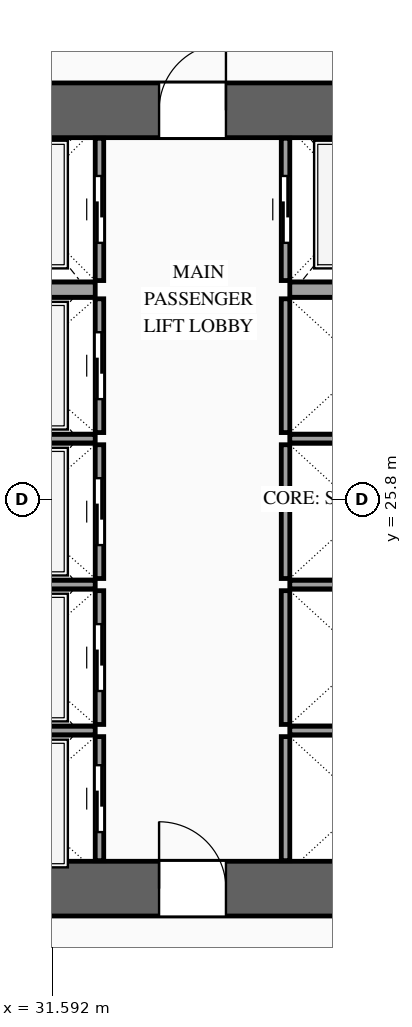
"""IFC4 building model, lengths in metres.
Left out: names, types, materials, properties, quantities, classifications, styles, units other than length and angle.
Written with IfcOpenShell. Run it as: python <this file> out.ifc"""

import sys

from ifc_helpers import new_model, si_unit, direction, frame, frame_2d, origin, place, context, subcontext, project, spatial, rectangle, extrude, source, transform, mapped, element, fill, save


model = new_model("IFC4")
c1 = context("Model", 3, precision=1e-05, world=origin(), true_north=direction((0.0, 1.0)))
c2 = subcontext(c1, "Body", "Model", "MODEL_VIEW")
j1 = project(units=[si_unit("LENGTHUNIT", "METRE"), si_unit("PLANEANGLEUNIT", "RADIAN")], contexts=[c1])
p1 = place(None, origin())
s1 = spatial("IfcSite", under=j1, at=p1, CompositionType="ELEMENT")
p2 = place(p1, origin())
s2 = spatial("IfcBuilding", under=s1, at=p2, CompositionType="ELEMENT")
p3 = place(p2, frame((0.0, 0.0, 10.2)))
s3 = spatial("IfcBuildingStorey", under=s2, at=p3, CompositionType="ELEMENT", Elevation=10.2)
p4 = place(p3, frame((23.35, 19.4, 0.0), z_axis=(0.0, 0.0, 1.0), x_axis=(1.0, 0.0, 0.0)))
e1 = element("IfcWall", 1, at=p4, inside=s3, PredefinedType="SHEAR", context=c2, shape_type="SweptSolid", body=[
    extrude(rectangle(XDim=27.3, YDim=0.9, at=frame_2d((13.65, 0.0))), origin(), (0.0, 0.0, 1.0), 4.8),
])
p5 = place(p4, frame((2.1, 0.0, 0.0)))
e2 = element("IfcOpeningElement", 2, at=p5, cuts=e1, PredefinedType="OPENING", context=c2, shape_type="SweptSolid", body=[
    extrude(rectangle(XDim=1.1, YDim=2.2, at=frame_2d((0.55, 1.1))), frame((0.0, 0.465, 0.0), z_axis=(0.0, -1.0, 0.0), x_axis=(1.0, 0.0, 0.0)), (0.0, 0.0, 1.0), 0.93),
])
p6 = place(p4, frame((10.0, 0.0, 0.0)))
e3 = element("IfcOpeningElement", 3, at=p6, cuts=e1, PredefinedType="OPENING", context=c2, shape_type="SweptSolid", body=[
    extrude(rectangle(XDim=1.1, YDim=2.2, at=frame_2d((0.55, 1.1))), frame((0.0, 0.465, 0.0), z_axis=(0.0, -1.0, 0.0), x_axis=(1.0, 0.0, 0.0)), (0.0, 0.0, 1.0), 0.93),
])
p7 = place(p4, frame((23.2, 0.0, 0.0)))
e4 = element("IfcOpeningElement", 4, at=p7, cuts=e1, PredefinedType="OPENING", context=c2, shape_type="SweptSolid", body=[
    extrude(rectangle(XDim=1.1, YDim=2.2, at=frame_2d((0.55, 1.1))), frame((0.0, 0.465, 0.0), z_axis=(0.0, -1.0, 0.0), x_axis=(1.0, 0.0, 0.0)), (0.0, 0.0, 1.0), 0.93),
])
p8 = place(p4, frame((19.82, 0.0, 0.0)))
e5 = element("IfcOpeningElement", 5, at=p8, cuts=e1, PredefinedType="OPENING", context=c2, shape_type="SweptSolid", body=[
    extrude(rectangle(XDim=0.9, YDim=2.15, at=frame_2d((0.45, 1.075))), frame((0.0, 0.465, 0.0), z_axis=(0.0, -1.0, 0.0), x_axis=(1.0, 0.0, 0.0)), (0.0, 0.0, 1.0), 0.93),
])
p9 = place(p4, frame((18.38, 0.0, 0.0)))
e6 = element("IfcOpeningElement", 6, at=p9, cuts=e1, PredefinedType="OPENING", context=c2, shape_type="SweptSolid", body=[
    extrude(rectangle(XDim=0.9, YDim=2.15, at=frame_2d((0.45, 1.075))), frame((0.0, 0.465, 0.0), z_axis=(0.0, -1.0, 0.0), x_axis=(1.0, 0.0, 0.0)), (0.0, 0.0, 1.0), 0.93),
])
p10 = place(p3, frame((23.35, 32.2, 0.0), z_axis=(0.0, 0.0, 1.0), x_axis=(1.0, 0.0, 0.0)))
e7 = element("IfcWall", 7, at=p10, inside=s3, PredefinedType="SHEAR", context=c2, shape_type="SweptSolid", body=[
    extrude(rectangle(XDim=27.3, YDim=0.9, at=frame_2d((13.65, 0.0))), origin(), (0.0, 0.0, 1.0), 4.8),
])
p11 = place(p10, frame((4.72, 0.0, 0.0)))
e8 = element("IfcOpeningElement", 8, at=p11, cuts=e7, PredefinedType="OPENING", context=c2, shape_type="SweptSolid", body=[
    extrude(rectangle(XDim=0.9, YDim=2.15, at=frame_2d((0.45, 1.075))), frame((0.0, 0.465, 0.0), z_axis=(0.0, -1.0, 0.0), x_axis=(1.0, 0.0, 0.0)), (0.0, 0.0, 1.0), 0.93),
])
p12 = place(p10, frame((10.0, 0.0, 0.0)))
e9 = element("IfcOpeningElement", 9, at=p12, cuts=e7, PredefinedType="OPENING", context=c2, shape_type="SweptSolid", body=[
    extrude(rectangle(XDim=1.1, YDim=2.2, at=frame_2d((0.55, 1.1))), frame((0.0, 0.465, 0.0), z_axis=(0.0, -1.0, 0.0), x_axis=(1.0, 0.0, 0.0)), (0.0, 0.0, 1.0), 0.93),
])
p13 = place(p10, frame((15.85, 0.0, 0.0)))
e10 = element("IfcOpeningElement", 10, at=p13, cuts=e7, PredefinedType="OPENING", context=c2, shape_type="SweptSolid", body=[
    extrude(rectangle(XDim=1.1, YDim=2.2, at=frame_2d((0.55, 1.1))), frame((0.0, 0.465, 0.0), z_axis=(0.0, -1.0, 0.0), x_axis=(1.0, 0.0, 0.0)), (0.0, 0.0, 1.0), 0.93),
])
p14 = place(p3, frame((32.37, 19.86, 0.0), z_axis=(0.0, 0.0, 1.0), x_axis=(0.0, 1.0, 0.0)))
e11 = element("IfcWall", 11, at=p14, inside=s3, PredefinedType="SOLIDWALL", context=c2, shape_type="SweptSolid", body=[
    extrude(rectangle(XDim=2.04, YDim=0.14, at=frame_2d((1.02, 0.0))), origin(), (0.0, 0.0, 1.0), 4.52),
])
p15 = place(p14, frame((0.47, 0.0, 0.0)))
e12 = element("IfcOpeningElement", 12, at=p15, cuts=e11, PredefinedType="OPENING", context=c2, shape_type="SweptSolid", body=[
    extrude(rectangle(XDim=1.1, YDim=2.2, at=frame_2d((0.55, 1.1))), frame((0.0, 0.085, 0.0), z_axis=(0.0, -1.0, 0.0), x_axis=(1.0, 0.0, 0.0)), (0.0, 0.0, 1.0), 0.17),
])
m1 = source(origin(), c2, "Body", "SweptSolid", [
    extrude(rectangle(XDim=2.5, YDim=0.14, at=frame_2d((1.25, 0.0))), origin(), (0.0, 0.0, 1.0), 4.52),
])
p16 = place(p3, frame((29.8, 22.0, 0.0), z_axis=(0.0, 0.0, 1.0), x_axis=(1.0, 0.0, 0.0)))
e13 = element("IfcWall", 13, at=p16, inside=s3, PredefinedType="SOLIDWALL", context=c2, shape_type="MappedRepresentation", body=[
    mapped(m1, transform((0.0, 0.0, 0.0), scale=1.0)),
])
p17 = place(p3, frame((32.37, 22.1, 0.0), z_axis=(0.0, 0.0, 1.0), x_axis=(0.0, 1.0, 0.0)))
e14 = element("IfcWall", 14, at=p17, inside=s3, PredefinedType="SOLIDWALL", context=c2, shape_type="SweptSolid", body=[
    extrude(rectangle(XDim=2.2, YDim=0.14, at=frame_2d((1.1, 0.0))), origin(), (0.0, 0.0, 1.0), 4.52),
])
p18 = place(p17, frame((0.55, 0.0, 0.0)))
e15 = element("IfcOpeningElement", 15, at=p18, cuts=e14, PredefinedType="OPENING", context=c2, shape_type="SweptSolid", body=[
    extrude(rectangle(XDim=1.1, YDim=2.2, at=frame_2d((0.55, 1.1))), frame((0.0, 0.085, 0.0), z_axis=(0.0, -1.0, 0.0), x_axis=(1.0, 0.0, 0.0)), (0.0, 0.0, 1.0), 0.17),
])
p19 = place(p3, frame((29.8, 24.4, 0.0), z_axis=(0.0, 0.0, 1.0), x_axis=(1.0, 0.0, 0.0)))
e16 = element("IfcWall", 16, at=p19, inside=s3, PredefinedType="SOLIDWALL", context=c2, shape_type="MappedRepresentation", body=[
    mapped(m1, transform((0.0, 0.0, 0.0), scale=1.0)),
])
p20 = place(p3, frame((32.37, 24.5, 0.0), z_axis=(0.0, 0.0, 1.0), x_axis=(0.0, 1.0, 0.0)))
e17 = element("IfcWall", 17, at=p20, inside=s3, PredefinedType="SOLIDWALL", context=c2, shape_type="SweptSolid", body=[
    extrude(rectangle(XDim=2.2, YDim=0.14, at=frame_2d((1.1, 0.0))), origin(), (0.0, 0.0, 1.0), 4.52),
])
p21 = place(p20, frame((0.55, 0.0, 0.0)))
e18 = element("IfcOpeningElement", 18, at=p21, cuts=e17, PredefinedType="OPENING", context=c2, shape_type="SweptSolid", body=[
    extrude(rectangle(XDim=1.1, YDim=2.2, at=frame_2d((0.55, 1.1))), frame((0.0, 0.085, 0.0), z_axis=(0.0, -1.0, 0.0), x_axis=(1.0, 0.0, 0.0)), (0.0, 0.0, 1.0), 0.17),
])
p22 = place(p3, frame((29.8, 26.8, 0.0), z_axis=(0.0, 0.0, 1.0), x_axis=(1.0, 0.0, 0.0)))
e19 = element("IfcWall", 19, at=p22, inside=s3, PredefinedType="SOLIDWALL", context=c2, shape_type="MappedRepresentation", body=[
    mapped(m1, transform((0.0, 0.0, 0.0), scale=1.0)),
])
p23 = place(p3, frame((32.37, 26.9, 0.0), z_axis=(0.0, 0.0, 1.0), x_axis=(0.0, 1.0, 0.0)))
e20 = element("IfcWall", 20, at=p23, inside=s3, PredefinedType="SOLIDWALL", context=c2, shape_type="SweptSolid", body=[
    extrude(rectangle(XDim=2.2, YDim=0.14, at=frame_2d((1.1, 0.0))), origin(), (0.0, 0.0, 1.0), 4.52),
])
p24 = place(p23, frame((0.55, 0.0, 0.0)))
e21 = element("IfcOpeningElement", 21, at=p24, cuts=e20, PredefinedType="OPENING", context=c2, shape_type="SweptSolid", body=[
    extrude(rectangle(XDim=1.1, YDim=2.2, at=frame_2d((0.55, 1.1))), frame((0.0, 0.085, 0.0), z_axis=(0.0, -1.0, 0.0), x_axis=(1.0, 0.0, 0.0)), (0.0, 0.0, 1.0), 0.17),
])
p25 = place(p3, frame((32.37, 29.4, 0.0), z_axis=(0.0, 0.0, 1.0), x_axis=(0.0, 1.0, 0.0)))
e22 = element("IfcWall", 22, at=p25, inside=s3, PredefinedType="SOLIDWALL", context=c2, shape_type="SweptSolid", body=[
    extrude(rectangle(XDim=2.34, YDim=0.14, at=frame_2d((1.17, 0.0))), origin(), (0.0, 0.0, 1.0), 4.52),
])
p26 = place(p25, frame((0.62, 0.0, 0.0)))
e23 = element("IfcOpeningElement", 23, at=p26, cuts=e22, PredefinedType="OPENING", context=c2, shape_type="SweptSolid", body=[
    extrude(rectangle(XDim=1.1, YDim=2.2, at=frame_2d((0.55, 1.1))), frame((0.0, 0.085, 0.0), z_axis=(0.0, -1.0, 0.0), x_axis=(1.0, 0.0, 0.0)), (0.0, 0.0, 1.0), 0.17),
])
m2 = source(origin(), c2, "Body", "SweptSolid", [
    extrude(rectangle(XDim=2.5, YDim=0.25, at=frame_2d((1.25, 0.0))), origin(), (0.0, 0.0, 1.0), 4.52),
])
p27 = place(p3, frame((29.8, 29.25, 0.0), z_axis=(0.0, 0.0, 1.0), x_axis=(1.0, 0.0, 0.0)))
e24 = element("IfcWall", 24, at=p27, inside=s3, PredefinedType="SOLIDWALL", context=c2, shape_type="MappedRepresentation", body=[
    mapped(m2, transform((0.0, 0.0, 0.0), scale=1.0)),
])
m3 = source(origin(), c2, "Body", "SweptSolid", [
    extrude(rectangle(XDim=2.04, YDim=0.14, at=frame_2d((1.02, 0.0))), origin(), (0.0, 0.0, 1.0), 4.52),
])
p28 = place(p3, frame((35.43, 19.86, 0.0), z_axis=(0.0, 0.0, 1.0), x_axis=(0.0, 1.0, 0.0)))
e25 = element("IfcWall", 25, at=p28, inside=s3, PredefinedType="SOLIDWALL", context=c2, shape_type="MappedRepresentation", body=[
    mapped(m3, transform((0.0, 0.0, 0.0), scale=1.0)),
])
m4 = source(origin(), c2, "Body", "SweptSolid", [
    extrude(rectangle(XDim=2.4, YDim=0.14, at=frame_2d((1.2, 0.0))), origin(), (0.0, 0.0, 1.0), 4.52),
])
p29 = place(p3, frame((35.5, 22.0, 0.0), z_axis=(0.0, 0.0, 1.0), x_axis=(1.0, 0.0, 0.0)))
e26 = element("IfcWall", 26, at=p29, inside=s3, PredefinedType="SOLIDWALL", context=c2, shape_type="MappedRepresentation", body=[
    mapped(m4, transform((0.0, 0.0, 0.0), scale=1.0)),
])
m5 = source(origin(), c2, "Body", "SweptSolid", [
    extrude(rectangle(XDim=2.2, YDim=0.14, at=frame_2d((1.1, 0.0))), origin(), (0.0, 0.0, 1.0), 4.52),
])
p30 = place(p3, frame((35.43, 22.1, 0.0), z_axis=(0.0, 0.0, 1.0), x_axis=(0.0, 1.0, 0.0)))
e27 = element("IfcWall", 27, at=p30, inside=s3, PredefinedType="SOLIDWALL", context=c2, shape_type="MappedRepresentation", body=[
    mapped(m5, transform((0.0, 0.0, 0.0), scale=1.0)),
])
p31 = place(p3, frame((35.5, 24.4, 0.0), z_axis=(0.0, 0.0, 1.0), x_axis=(1.0, 0.0, 0.0)))
e28 = element("IfcWall", 28, at=p31, inside=s3, PredefinedType="SOLIDWALL", context=c2, shape_type="MappedRepresentation", body=[
    mapped(m4, transform((0.0, 0.0, 0.0), scale=1.0)),
])
p32 = place(p3, frame((35.43, 24.5, 0.0), z_axis=(0.0, 0.0, 1.0), x_axis=(0.0, 1.0, 0.0)))
e29 = element("IfcWall", 29, at=p32, inside=s3, PredefinedType="SOLIDWALL", context=c2, shape_type="MappedRepresentation", body=[
    mapped(m5, transform((0.0, 0.0, 0.0), scale=1.0)),
])
p33 = place(p3, frame((35.5, 26.8, 0.0), z_axis=(0.0, 0.0, 1.0), x_axis=(1.0, 0.0, 0.0)))
e30 = element("IfcWall", 30, at=p33, inside=s3, PredefinedType="SOLIDWALL", context=c2, shape_type="MappedRepresentation", body=[
    mapped(m4, transform((0.0, 0.0, 0.0), scale=1.0)),
])
m6 = source(origin(), c2, "Body", "SweptSolid", [
    extrude(rectangle(XDim=2.2, YDim=0.14, at=frame_2d((1.1, 0.0))), origin(), (0.0, 0.0, 1.0), 4.52),
])
p34 = place(p3, frame((35.43, 26.9, 0.0), z_axis=(0.0, 0.0, 1.0), x_axis=(0.0, 1.0, 0.0)))
e31 = element("IfcWall", 31, at=p34, inside=s3, PredefinedType="SOLIDWALL", context=c2, shape_type="MappedRepresentation", body=[
    mapped(m6, transform((0.0, 0.0, 0.0), scale=1.0)),
])
p35 = place(p3, frame((35.43, 29.4, 0.0), z_axis=(0.0, 0.0, 1.0), x_axis=(0.0, 1.0, 0.0)))
e32 = element("IfcWall", 32, at=p35, inside=s3, PredefinedType="SOLIDWALL", context=c2, shape_type="SweptSolid", body=[
    extrude(rectangle(XDim=2.34, YDim=0.14, at=frame_2d((1.17, 0.0))), origin(), (0.0, 0.0, 1.0), 4.52),
])
p36 = place(p35, frame((0.62, 0.0, 0.0)))
e33 = element("IfcOpeningElement", 33, at=p36, cuts=e32, PredefinedType="OPENING", context=c2, shape_type="SweptSolid", body=[
    extrude(rectangle(XDim=1.1, YDim=2.2, at=frame_2d((0.55, 1.1))), frame((0.0, 0.085, 0.0), z_axis=(0.0, -1.0, 0.0), x_axis=(1.0, 0.0, 0.0)), (0.0, 0.0, 1.0), 0.17),
])
m7 = source(origin(), c2, "Body", "SweptSolid", [
    extrude(rectangle(XDim=2.4, YDim=0.25, at=frame_2d((1.2, 0.0))), origin(), (0.0, 0.0, 1.0), 4.52),
])
p37 = place(p3, frame((35.5, 29.25, 0.0), z_axis=(0.0, 0.0, 1.0), x_axis=(1.0, 0.0, 0.0)))
e34 = element("IfcWall", 34, at=p37, inside=s3, PredefinedType="SOLIDWALL", context=c2, shape_type="MappedRepresentation", body=[
    mapped(m7, transform((0.0, 0.0, 0.0), scale=1.0)),
])
m8 = source(origin(), c2, "Body", "SweptSolid", [
    extrude(rectangle(XDim=1.1, YDim=2.2, at=frame_2d((0.55, 1.1))), frame((0.0, 0.025, 0.0), z_axis=(0.0, -1.0, 0.0), x_axis=(1.0, 0.0, 0.0)), (0.0, 0.0, 1.0), 0.05),
])
p38 = place(p15, origin())
e35 = element("IfcDoor", 35, at=p38, inside=s3, OperationType="SLIDING_TO_LEFT", PredefinedType="DOOR", context=c2, shape_type="MappedRepresentation", body=[
    mapped(m8, transform((0.0, 0.0, 0.0), scale=1.0)),
])
fill(e12, e35)
p39 = place(p18, origin())
e36 = element("IfcDoor", 36, at=p39, inside=s3, OperationType="SLIDING_TO_RIGHT", PredefinedType="DOOR", context=c2, shape_type="MappedRepresentation", body=[
    mapped(m8, transform((0.0, 0.0, 0.0), scale=1.0)),
])
fill(e15, e36)
p40 = place(p21, origin())
e37 = element("IfcDoor", 37, at=p40, inside=s3, OperationType="SLIDING_TO_LEFT", PredefinedType="DOOR", context=c2, shape_type="MappedRepresentation", body=[
    mapped(m8, transform((0.0, 0.0, 0.0), scale=1.0)),
])
fill(e18, e37)
p41 = place(p24, origin())
e38 = element("IfcDoor", 38, at=p41, inside=s3, OperationType="SLIDING_TO_RIGHT", PredefinedType="DOOR", context=c2, shape_type="MappedRepresentation", body=[
    mapped(m8, transform((0.0, 0.0, 0.0), scale=1.0)),
])
fill(e21, e38)
p42 = place(p26, origin())
e39 = element("IfcDoor", 39, at=p42, inside=s3, OperationType="SLIDING_TO_LEFT", PredefinedType="DOOR", context=c2, shape_type="MappedRepresentation", body=[
    mapped(m8, transform((0.0, 0.0, 0.0), scale=1.0)),
])
fill(e23, e39)
p43 = place(p36, origin())
e40 = element("IfcDoor", 40, at=p43, inside=s3, OperationType="SLIDING_TO_RIGHT", PredefinedType="DOOR", context=c2, shape_type="MappedRepresentation", body=[
    mapped(m8, transform((0.0, 0.0, 0.0), scale=1.0)),
])
fill(e33, e40)
m9 = source(origin(), c2, "Body", "SweptSolid", [
    extrude(rectangle(XDim=1.1, YDim=2.2, at=frame_2d((0.55, 1.1))), frame((0.0, 0.025, 0.0), z_axis=(0.0, -1.0, 0.0), x_axis=(1.0, 0.0, 0.0)), (0.0, 0.0, 1.0), 0.05),
])
p44 = place(p6, origin())
e41 = element("IfcDoor", 41, at=p44, inside=s3, OperationType="SINGLE_SWING_LEFT", PredefinedType="DOOR", context=c2, shape_type="MappedRepresentation", body=[
    mapped(m9, transform((0.0, 0.0, 0.0), scale=1.0)),
])
fill(e3, e41)
p45 = place(p12, origin())
e42 = element("IfcDoor", 42, at=p45, inside=s3, OperationType="SINGLE_SWING_RIGHT", PredefinedType="DOOR", context=c2, shape_type="MappedRepresentation", body=[
    mapped(m9, transform((0.0, 0.0, 0.0), scale=1.0)),
])
fill(e9, e42)
save(model, sys.argv[1])
